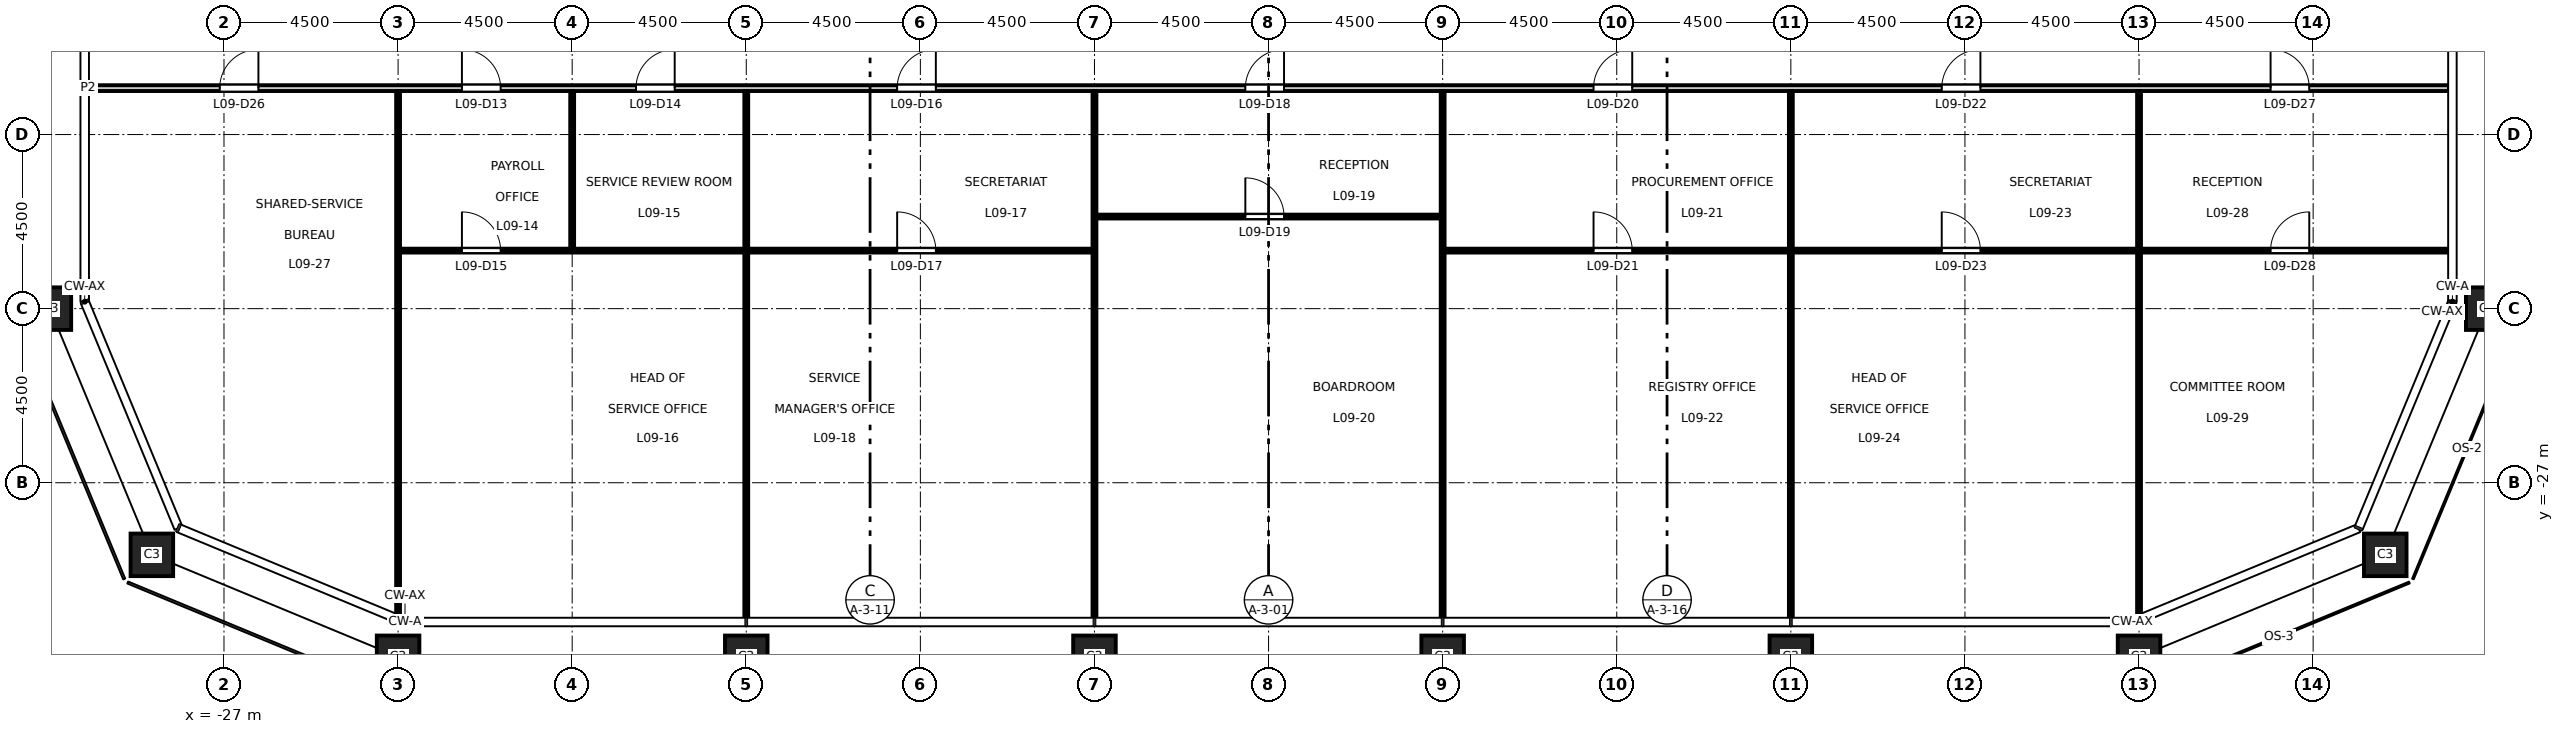
"""IFC4 building model, lengths in metres.
Left out: names, types, materials, properties, quantities, classifications, styles, units other than length and angle.
Written with IfcOpenShell. Run it as: python <this file> out.ifc"""

import sys

from ifc_helpers import new_model, si_unit, direction, frame, frame_2d, origin, origin_2d, place, context, subcontext, project, spatial, rectangle, hollow_rectangle, extrude, element, fill, save


model = new_model("IFC4")
c1 = context("Model", 3, precision=1e-05, world=origin(), true_north=direction((0.0, 1.0)))
c2 = subcontext(c1, "Body", "Model", "MODEL_VIEW")
j1 = project(units=[si_unit("LENGTHUNIT", "METRE"), si_unit("PLANEANGLEUNIT", "RADIAN")], contexts=[c1])
p1 = place(None, origin())
s1 = spatial("IfcSite", under=j1, at=p1, CompositionType="ELEMENT")
p2 = place(p1, origin())
s2 = spatial("IfcBuilding", under=s1, at=p2, CompositionType="ELEMENT")
p3 = place(p2, frame((0.0, 0.0, 44.7)))
s3 = spatial("IfcBuildingStorey", under=s2, at=p3, CompositionType="ELEMENT", Elevation=44.7)
for number, where, z_axis, x_axis in (
    (1, (-22.5, -31.5, 0.0), (0.0, 0.0, 1.0), (1.0, 0.0, 0.0)),
    (2, (-13.5, -31.5, 0.0), (0.0, 0.0, 1.0), (1.0, 0.0, 0.0)),
    (3, (-4.5, -31.5, 0.0), (0.0, 0.0, 1.0), (1.0, 0.0, 0.0)),
    (4, (4.5, -31.5, 0.0), (0.0, 0.0, 1.0), (1.0, 0.0, 0.0)),
    (5, (13.5, -31.5, 0.0), (0.0, 0.0, 1.0), (1.0, 0.0, 0.0)),
    (6, (22.5, -31.5, 0.0), (0.0, 0.0, 1.0), (1.0, 0.0, 0.0)),
    (7, (28.864, -28.864, 0.0), (0.0, 0.0, 1.0), (1.0, 0.0, 0.0)),
    (8, (31.5, -22.5, 0.0), (0.0, 0.0, 1.0), (1.0, 0.0, 0.0)),
    (9, (-31.5, -22.5, 0.0), (0.0, 0.0, 1.0), (1.0, 0.0, 0.0)),
    (10, (-28.864, -28.864, 0.0), (0.0, 0.0, 1.0), (1.0, 0.0, 0.0)),
):
    element("IfcColumn", number, at=place(p3, frame(where, z_axis=z_axis, x_axis=x_axis)), inside=s3, PredefinedType="COLUMN", context=c2, shape_type="SweptSolid", body=[
        extrude(hollow_rectangle(XDim=1.1, YDim=1.1, WallThickness=0.07, at=origin_2d()), origin(), (0.0, 0.0, 1.0), 4.5),
    ])
p4 = place(p3, frame((-22.45, -21.0, 0.0), z_axis=(0.0, 0.0, 1.0), x_axis=(1.0, 0.0, 0.0)))
e11 = element("IfcWall", 11, at=p4, inside=s3, PredefinedType="PARTITIONING", context=c2, shape_type="SweptSolid", body=[
    extrude(rectangle(XDim=17.9, YDim=0.1, at=frame_2d((8.95, 0.0))), origin(), (0.0, 0.0, 1.0), 4.35),
])
p5 = place(p4, frame((1.6, 0.0, 0.0)))
e12 = element("IfcOpeningElement", 12, at=p5, cuts=e11, PredefinedType="OPENING", context=c2, shape_type="SweptSolid", body=[
    extrude(rectangle(XDim=1.0, YDim=2.1, at=frame_2d((0.5, 1.05))), frame((0.0, 0.06, 0.0), z_axis=(0.0, -1.0, 0.0), x_axis=(1.0, 0.0, 0.0)), (0.0, 0.0, 1.0), 0.12),
])
p6 = place(p4, frame((12.85, 0.0, 0.0)))
e13 = element("IfcOpeningElement", 13, at=p6, cuts=e11, PredefinedType="OPENING", context=c2, shape_type="SweptSolid", body=[
    extrude(rectangle(XDim=1.0, YDim=2.1, at=frame_2d((0.5, 1.05))), frame((0.0, 0.06, 0.0), z_axis=(0.0, -1.0, 0.0), x_axis=(1.0, 0.0, 0.0)), (0.0, 0.0, 1.0), 0.12),
])
p7 = place(p3, frame((4.55, -21.0, 0.0), z_axis=(0.0, 0.0, 1.0), x_axis=(1.0, 0.0, 0.0)))
e14 = element("IfcWall", 14, at=p7, inside=s3, PredefinedType="PARTITIONING", context=c2, shape_type="SweptSolid", body=[
    extrude(rectangle(XDim=25.96, YDim=0.1, at=frame_2d((12.98, 0.0))), origin(), (0.0, 0.0, 1.0), 4.35),
])
p8 = place(p7, frame((3.85, 0.0, 0.0)))
e15 = element("IfcOpeningElement", 15, at=p8, cuts=e14, PredefinedType="OPENING", context=c2, shape_type="SweptSolid", body=[
    extrude(rectangle(XDim=1.0, YDim=2.1, at=frame_2d((0.5, 1.05))), frame((0.0, 0.06, 0.0), z_axis=(0.0, -1.0, 0.0), x_axis=(1.0, 0.0, 0.0)), (0.0, 0.0, 1.0), 0.12),
])
p9 = place(p7, frame((12.85, 0.0, 0.0)))
e16 = element("IfcOpeningElement", 16, at=p9, cuts=e14, PredefinedType="OPENING", context=c2, shape_type="SweptSolid", body=[
    extrude(rectangle(XDim=1.0, YDim=2.1, at=frame_2d((0.5, 1.05))), frame((0.0, 0.06, 0.0), z_axis=(0.0, -1.0, 0.0), x_axis=(1.0, 0.0, 0.0)), (0.0, 0.0, 1.0), 0.12),
])
p10 = place(p7, frame((21.35, 0.0, 0.0)))
e17 = element("IfcOpeningElement", 17, at=p10, cuts=e14, PredefinedType="OPENING", context=c2, shape_type="SweptSolid", body=[
    extrude(rectangle(XDim=1.0, YDim=2.1, at=frame_2d((0.5, 1.05))), frame((0.0, 0.06, 0.0), z_axis=(0.0, -1.0, 0.0), x_axis=(1.0, 0.0, 0.0)), (0.0, 0.0, 1.0), 0.12),
])
p11 = place(p3, frame((-4.45, -20.12, 0.0), z_axis=(0.0, 0.0, 1.0), x_axis=(1.0, 0.0, 0.0)))
e18 = element("IfcWall", 18, at=p11, inside=s3, PredefinedType="PARTITIONING", context=c2, shape_type="SweptSolid", body=[
    extrude(rectangle(XDim=8.9, YDim=0.1, at=frame_2d((4.45, 0.0))), origin(), (0.0, 0.0, 1.0), 4.35),
])
p12 = place(p11, frame((3.85, 0.0, 0.0)))
e19 = element("IfcOpeningElement", 19, at=p12, cuts=e18, PredefinedType="OPENING", context=c2, shape_type="SweptSolid", body=[
    extrude(rectangle(XDim=1.0, YDim=2.1, at=frame_2d((0.5, 1.05))), frame((0.0, 0.06, 0.0), z_axis=(0.0, -1.0, 0.0), x_axis=(1.0, 0.0, 0.0)), (0.0, 0.0, 1.0), 0.12),
])
p13 = place(p3, frame((-30.51, -16.8, 0.0), z_axis=(0.0, 0.0, 1.0), x_axis=(1.0, 0.0, 0.0)))
e20 = element("IfcWall", 20, at=p13, inside=s3, PredefinedType="PARTITIONING", context=c2, shape_type="SweptSolid", body=[
    extrude(rectangle(XDim=61.02, YDim=0.15, at=frame_2d((30.51, 0.0))), origin(), (0.0, 0.0, 1.0), 4.35),
])
p14 = place(p13, frame((9.66, 0.0, 0.0)))
e21 = element("IfcOpeningElement", 21, at=p14, cuts=e20, PredefinedType="OPENING", context=c2, shape_type="SweptSolid", body=[
    extrude(rectangle(XDim=1.0, YDim=2.1, at=frame_2d((0.5, 1.05))), frame((0.0, 0.085, 0.0), z_axis=(0.0, -1.0, 0.0), x_axis=(1.0, 0.0, 0.0)), (0.0, 0.0, 1.0), 0.17),
])
p15 = place(p13, frame((14.16, 0.0, 0.0)))
e22 = element("IfcOpeningElement", 22, at=p15, cuts=e20, PredefinedType="OPENING", context=c2, shape_type="SweptSolid", body=[
    extrude(rectangle(XDim=1.0, YDim=2.1, at=frame_2d((0.5, 1.05))), frame((0.0, 0.085, 0.0), z_axis=(0.0, -1.0, 0.0), x_axis=(1.0, 0.0, 0.0)), (0.0, 0.0, 1.0), 0.17),
])
p16 = place(p13, frame((20.91, 0.0, 0.0)))
e23 = element("IfcOpeningElement", 23, at=p16, cuts=e20, PredefinedType="OPENING", context=c2, shape_type="SweptSolid", body=[
    extrude(rectangle(XDim=1.0, YDim=2.1, at=frame_2d((0.5, 1.05))), frame((0.0, 0.085, 0.0), z_axis=(0.0, -1.0, 0.0), x_axis=(1.0, 0.0, 0.0)), (0.0, 0.0, 1.0), 0.17),
])
p17 = place(p13, frame((29.91, 0.0, 0.0)))
e24 = element("IfcOpeningElement", 24, at=p17, cuts=e20, PredefinedType="OPENING", context=c2, shape_type="SweptSolid", body=[
    extrude(rectangle(XDim=1.0, YDim=2.1, at=frame_2d((0.5, 1.05))), frame((0.0, 0.085, 0.0), z_axis=(0.0, -1.0, 0.0), x_axis=(1.0, 0.0, 0.0)), (0.0, 0.0, 1.0), 0.17),
])
p18 = place(p13, frame((38.91, 0.0, 0.0)))
e25 = element("IfcOpeningElement", 25, at=p18, cuts=e20, PredefinedType="OPENING", context=c2, shape_type="SweptSolid", body=[
    extrude(rectangle(XDim=1.0, YDim=2.1, at=frame_2d((0.5, 1.05))), frame((0.0, 0.085, 0.0), z_axis=(0.0, -1.0, 0.0), x_axis=(1.0, 0.0, 0.0)), (0.0, 0.0, 1.0), 0.17),
])
p19 = place(p13, frame((47.91, 0.0, 0.0)))
e26 = element("IfcOpeningElement", 26, at=p19, cuts=e20, PredefinedType="OPENING", context=c2, shape_type="SweptSolid", body=[
    extrude(rectangle(XDim=1.0, YDim=2.1, at=frame_2d((0.5, 1.05))), frame((0.0, 0.085, 0.0), z_axis=(0.0, -1.0, 0.0), x_axis=(1.0, 0.0, 0.0)), (0.0, 0.0, 1.0), 0.17),
])
p20 = place(p13, frame((3.4, 0.0, 0.0)))
e27 = element("IfcOpeningElement", 27, at=p20, cuts=e20, PredefinedType="OPENING", context=c2, shape_type="SweptSolid", body=[
    extrude(rectangle(XDim=1.0, YDim=2.1, at=frame_2d((0.5, 1.05))), frame((0.0, 0.085, 0.0), z_axis=(0.0, -1.0, 0.0), x_axis=(1.0, 0.0, 0.0)), (0.0, 0.0, 1.0), 0.17),
])
p21 = place(p13, frame((56.41, 0.0, 0.0)))
e28 = element("IfcOpeningElement", 28, at=p21, cuts=e20, PredefinedType="OPENING", context=c2, shape_type="SweptSolid", body=[
    extrude(rectangle(XDim=1.0, YDim=2.1, at=frame_2d((0.5, 1.05))), frame((0.0, 0.085, 0.0), z_axis=(0.0, -1.0, 0.0), x_axis=(1.0, 0.0, 0.0)), (0.0, 0.0, 1.0), 0.17),
])
p22 = place(p3, frame((-22.5, -30.428, 0.0), z_axis=(0.0, 0.0, 1.0), x_axis=(0.0, 1.0, 0.0)))
e29 = element("IfcWall", 29, at=p22, inside=s3, PredefinedType="PARTITIONING", context=c2, shape_type="SweptSolid", body=[
    extrude(rectangle(XDim=13.553, YDim=0.1, at=frame_2d((6.776, 0.0))), origin(), (0.0, 0.0, 1.0), 3.35),
])
p23 = place(p3, frame((-18.0, -20.95, 0.0), z_axis=(0.0, 0.0, 1.0), x_axis=(0.0, 1.0, 0.0)))
e30 = element("IfcWall", 30, at=p23, inside=s3, PredefinedType="PARTITIONING", context=c2, shape_type="SweptSolid", body=[
    extrude(rectangle(XDim=4.075, YDim=0.1, at=frame_2d((2.038, 0.0))), origin(), (0.0, 0.0, 1.0), 4.35),
])
p24 = place(p3, frame((-13.5, -30.51, 0.0), z_axis=(0.0, 0.0, 1.0), x_axis=(0.0, 1.0, 0.0)))
e31 = element("IfcWall", 31, at=p24, inside=s3, PredefinedType="PARTITIONING", context=c2, shape_type="SweptSolid", body=[
    extrude(rectangle(XDim=9.46, YDim=0.1, at=frame_2d((4.73, 0.0))), origin(), (0.0, 0.0, 1.0), 3.35),
])
p25 = place(p3, frame((-13.5, -20.95, 0.0), z_axis=(0.0, 0.0, 1.0), x_axis=(0.0, 1.0, 0.0)))
e32 = element("IfcWall", 32, at=p25, inside=s3, PredefinedType="PARTITIONING", context=c2, shape_type="SweptSolid", body=[
    extrude(rectangle(XDim=4.075, YDim=0.1, at=frame_2d((2.038, 0.0))), origin(), (0.0, 0.0, 1.0), 3.35),
])
for number, where, z_axis, x_axis in (
    (33, (-4.5, -30.51, 0.0), (0.0, 0.0, 1.0), (0.0, 1.0, 0.0)),
    (34, (4.5, -30.51, 0.0), (0.0, 0.0, 1.0), (0.0, 1.0, 0.0)),
):
    element("IfcWall", number, at=place(p3, frame(where, z_axis=z_axis, x_axis=x_axis)), inside=s3, PredefinedType="PARTITIONING", context=c2, shape_type="SweptSolid", body=[
        extrude(rectangle(XDim=13.635, YDim=0.1, at=frame_2d((6.817, 0.0))), origin(), (0.0, 0.0, 1.0), 3.35),
    ])
p26 = place(p3, frame((13.5, -30.51, 0.0), z_axis=(0.0, 0.0, 1.0), x_axis=(0.0, 1.0, 0.0)))
e35 = element("IfcWall", 35, at=p26, inside=s3, PredefinedType="PARTITIONING", context=c2, shape_type="SweptSolid", body=[
    extrude(rectangle(XDim=9.46, YDim=0.1, at=frame_2d((4.73, 0.0))), origin(), (0.0, 0.0, 1.0), 3.35),
])
p27 = place(p3, frame((13.5, -20.95, 0.0), z_axis=(0.0, 0.0, 1.0), x_axis=(0.0, 1.0, 0.0)))
e36 = element("IfcWall", 36, at=p27, inside=s3, PredefinedType="PARTITIONING", context=c2, shape_type="SweptSolid", body=[
    extrude(rectangle(XDim=4.075, YDim=0.1, at=frame_2d((2.038, 0.0))), origin(), (0.0, 0.0, 1.0), 3.35),
])
p28 = place(p3, frame((22.5, -30.428, 0.0), z_axis=(0.0, 0.0, 1.0), x_axis=(0.0, 1.0, 0.0)))
e37 = element("IfcWall", 37, at=p28, inside=s3, PredefinedType="PARTITIONING", context=c2, shape_type="SweptSolid", body=[
    extrude(rectangle(XDim=9.378, YDim=0.1, at=frame_2d((4.689, 0.0))), origin(), (0.0, 0.0, 1.0), 3.35),
])
p29 = place(p3, frame((22.5, -20.95, 0.0), z_axis=(0.0, 0.0, 1.0), x_axis=(0.0, 1.0, 0.0)))
e38 = element("IfcWall", 38, at=p29, inside=s3, PredefinedType="PARTITIONING", context=c2, shape_type="SweptSolid", body=[
    extrude(rectangle(XDim=4.075, YDim=0.1, at=frame_2d((2.038, 0.0))), origin(), (0.0, 0.0, 1.0), 3.35),
])
p30 = place(p14, origin())
e39 = element("IfcDoor", 39, at=p30, inside=s3, OperationType="SINGLE_SWING_LEFT", PredefinedType="DOOR", context=c2, shape_type="SweptSolid", body=[
    extrude(rectangle(XDim=1.0, YDim=2.1, at=frame_2d((0.5, 1.05))), frame((0.0, 0.025, 0.0), z_axis=(0.0, -1.0, 0.0), x_axis=(1.0, 0.0, 0.0)), (0.0, 0.0, 1.0), 0.05),
])
fill(e21, e39)
p31 = place(p15, origin())
e40 = element("IfcDoor", 40, at=p31, inside=s3, OperationType="SINGLE_SWING_RIGHT", PredefinedType="DOOR", context=c2, shape_type="SweptSolid", body=[
    extrude(rectangle(XDim=1.0, YDim=2.1, at=frame_2d((0.5, 1.05))), frame((0.0, 0.025, 0.0), z_axis=(0.0, -1.0, 0.0), x_axis=(1.0, 0.0, 0.0)), (0.0, 0.0, 1.0), 0.05),
])
fill(e22, e40)
p32 = place(p5, origin())
e41 = element("IfcDoor", 41, at=p32, inside=s3, OperationType="SINGLE_SWING_LEFT", PredefinedType="DOOR", context=c2, shape_type="SweptSolid", body=[
    extrude(rectangle(XDim=1.0, YDim=2.1, at=frame_2d((0.5, 1.05))), frame((0.0, 0.025, 0.0), z_axis=(0.0, -1.0, 0.0), x_axis=(1.0, 0.0, 0.0)), (0.0, 0.0, 1.0), 0.05),
])
fill(e12, e41)
p33 = place(p16, origin())
e42 = element("IfcDoor", 42, at=p33, inside=s3, OperationType="SINGLE_SWING_RIGHT", PredefinedType="DOOR", context=c2, shape_type="SweptSolid", body=[
    extrude(rectangle(XDim=1.0, YDim=2.1, at=frame_2d((0.5, 1.05))), frame((0.0, 0.025, 0.0), z_axis=(0.0, -1.0, 0.0), x_axis=(1.0, 0.0, 0.0)), (0.0, 0.0, 1.0), 0.05),
])
fill(e23, e42)
p34 = place(p6, origin())
e43 = element("IfcDoor", 43, at=p34, inside=s3, OperationType="SINGLE_SWING_LEFT", PredefinedType="DOOR", context=c2, shape_type="SweptSolid", body=[
    extrude(rectangle(XDim=1.0, YDim=2.1, at=frame_2d((0.5, 1.05))), frame((0.0, 0.025, 0.0), z_axis=(0.0, -1.0, 0.0), x_axis=(1.0, 0.0, 0.0)), (0.0, 0.0, 1.0), 0.05),
])
fill(e13, e43)
p35 = place(p17, origin())
e44 = element("IfcDoor", 44, at=p35, inside=s3, OperationType="SINGLE_SWING_RIGHT", PredefinedType="DOOR", context=c2, shape_type="SweptSolid", body=[
    extrude(rectangle(XDim=1.0, YDim=2.1, at=frame_2d((0.5, 1.05))), frame((0.0, 0.025, 0.0), z_axis=(0.0, -1.0, 0.0), x_axis=(1.0, 0.0, 0.0)), (0.0, 0.0, 1.0), 0.05),
])
fill(e24, e44)
p36 = place(p12, origin())
e45 = element("IfcDoor", 45, at=p36, inside=s3, OperationType="SINGLE_SWING_LEFT", PredefinedType="DOOR", context=c2, shape_type="SweptSolid", body=[
    extrude(rectangle(XDim=1.0, YDim=2.1, at=frame_2d((0.5, 1.05))), frame((0.0, 0.025, 0.0), z_axis=(0.0, -1.0, 0.0), x_axis=(1.0, 0.0, 0.0)), (0.0, 0.0, 1.0), 0.05),
])
fill(e19, e45)
p37 = place(p18, origin())
e46 = element("IfcDoor", 46, at=p37, inside=s3, OperationType="SINGLE_SWING_RIGHT", PredefinedType="DOOR", context=c2, shape_type="SweptSolid", body=[
    extrude(rectangle(XDim=1.0, YDim=2.1, at=frame_2d((0.5, 1.05))), frame((0.0, 0.025, 0.0), z_axis=(0.0, -1.0, 0.0), x_axis=(1.0, 0.0, 0.0)), (0.0, 0.0, 1.0), 0.05),
])
fill(e25, e46)
p38 = place(p8, origin())
e47 = element("IfcDoor", 47, at=p38, inside=s3, OperationType="SINGLE_SWING_LEFT", PredefinedType="DOOR", context=c2, shape_type="SweptSolid", body=[
    extrude(rectangle(XDim=1.0, YDim=2.1, at=frame_2d((0.5, 1.05))), frame((0.0, 0.025, 0.0), z_axis=(0.0, -1.0, 0.0), x_axis=(1.0, 0.0, 0.0)), (0.0, 0.0, 1.0), 0.05),
])
fill(e15, e47)
p39 = place(p19, origin())
e48 = element("IfcDoor", 48, at=p39, inside=s3, OperationType="SINGLE_SWING_RIGHT", PredefinedType="DOOR", context=c2, shape_type="SweptSolid", body=[
    extrude(rectangle(XDim=1.0, YDim=2.1, at=frame_2d((0.5, 1.05))), frame((0.0, 0.025, 0.0), z_axis=(0.0, -1.0, 0.0), x_axis=(1.0, 0.0, 0.0)), (0.0, 0.0, 1.0), 0.05),
])
fill(e26, e48)
p40 = place(p9, origin())
e49 = element("IfcDoor", 49, at=p40, inside=s3, OperationType="SINGLE_SWING_LEFT", PredefinedType="DOOR", context=c2, shape_type="SweptSolid", body=[
    extrude(rectangle(XDim=1.0, YDim=2.1, at=frame_2d((0.5, 1.05))), frame((0.0, 0.025, 0.0), z_axis=(0.0, -1.0, 0.0), x_axis=(1.0, 0.0, 0.0)), (0.0, 0.0, 1.0), 0.05),
])
fill(e16, e49)
p41 = place(p20, origin())
e50 = element("IfcDoor", 50, at=p41, inside=s3, OperationType="SINGLE_SWING_RIGHT", PredefinedType="DOOR", context=c2, shape_type="SweptSolid", body=[
    extrude(rectangle(XDim=1.0, YDim=2.1, at=frame_2d((0.5, 1.05))), frame((0.0, 0.025, 0.0), z_axis=(0.0, -1.0, 0.0), x_axis=(1.0, 0.0, 0.0)), (0.0, 0.0, 1.0), 0.05),
])
fill(e27, e50)
p42 = place(p21, origin())
e51 = element("IfcDoor", 51, at=p42, inside=s3, OperationType="SINGLE_SWING_LEFT", PredefinedType="DOOR", context=c2, shape_type="SweptSolid", body=[
    extrude(rectangle(XDim=1.0, YDim=2.1, at=frame_2d((0.5, 1.05))), frame((0.0, 0.025, 0.0), z_axis=(0.0, -1.0, 0.0), x_axis=(1.0, 0.0, 0.0)), (0.0, 0.0, 1.0), 0.05),
])
fill(e28, e51)
p43 = place(p10, origin())
e52 = element("IfcDoor", 52, at=p43, inside=s3, OperationType="SINGLE_SWING_RIGHT", PredefinedType="DOOR", context=c2, shape_type="SweptSolid", body=[
    extrude(rectangle(XDim=1.0, YDim=2.1, at=frame_2d((0.5, 1.05))), frame((0.0, 0.025, 0.0), z_axis=(0.0, -1.0, 0.0), x_axis=(1.0, 0.0, 0.0)), (0.0, 0.0, 1.0), 0.05),
])
fill(e17, e52)
save(model, sys.argv[1])
